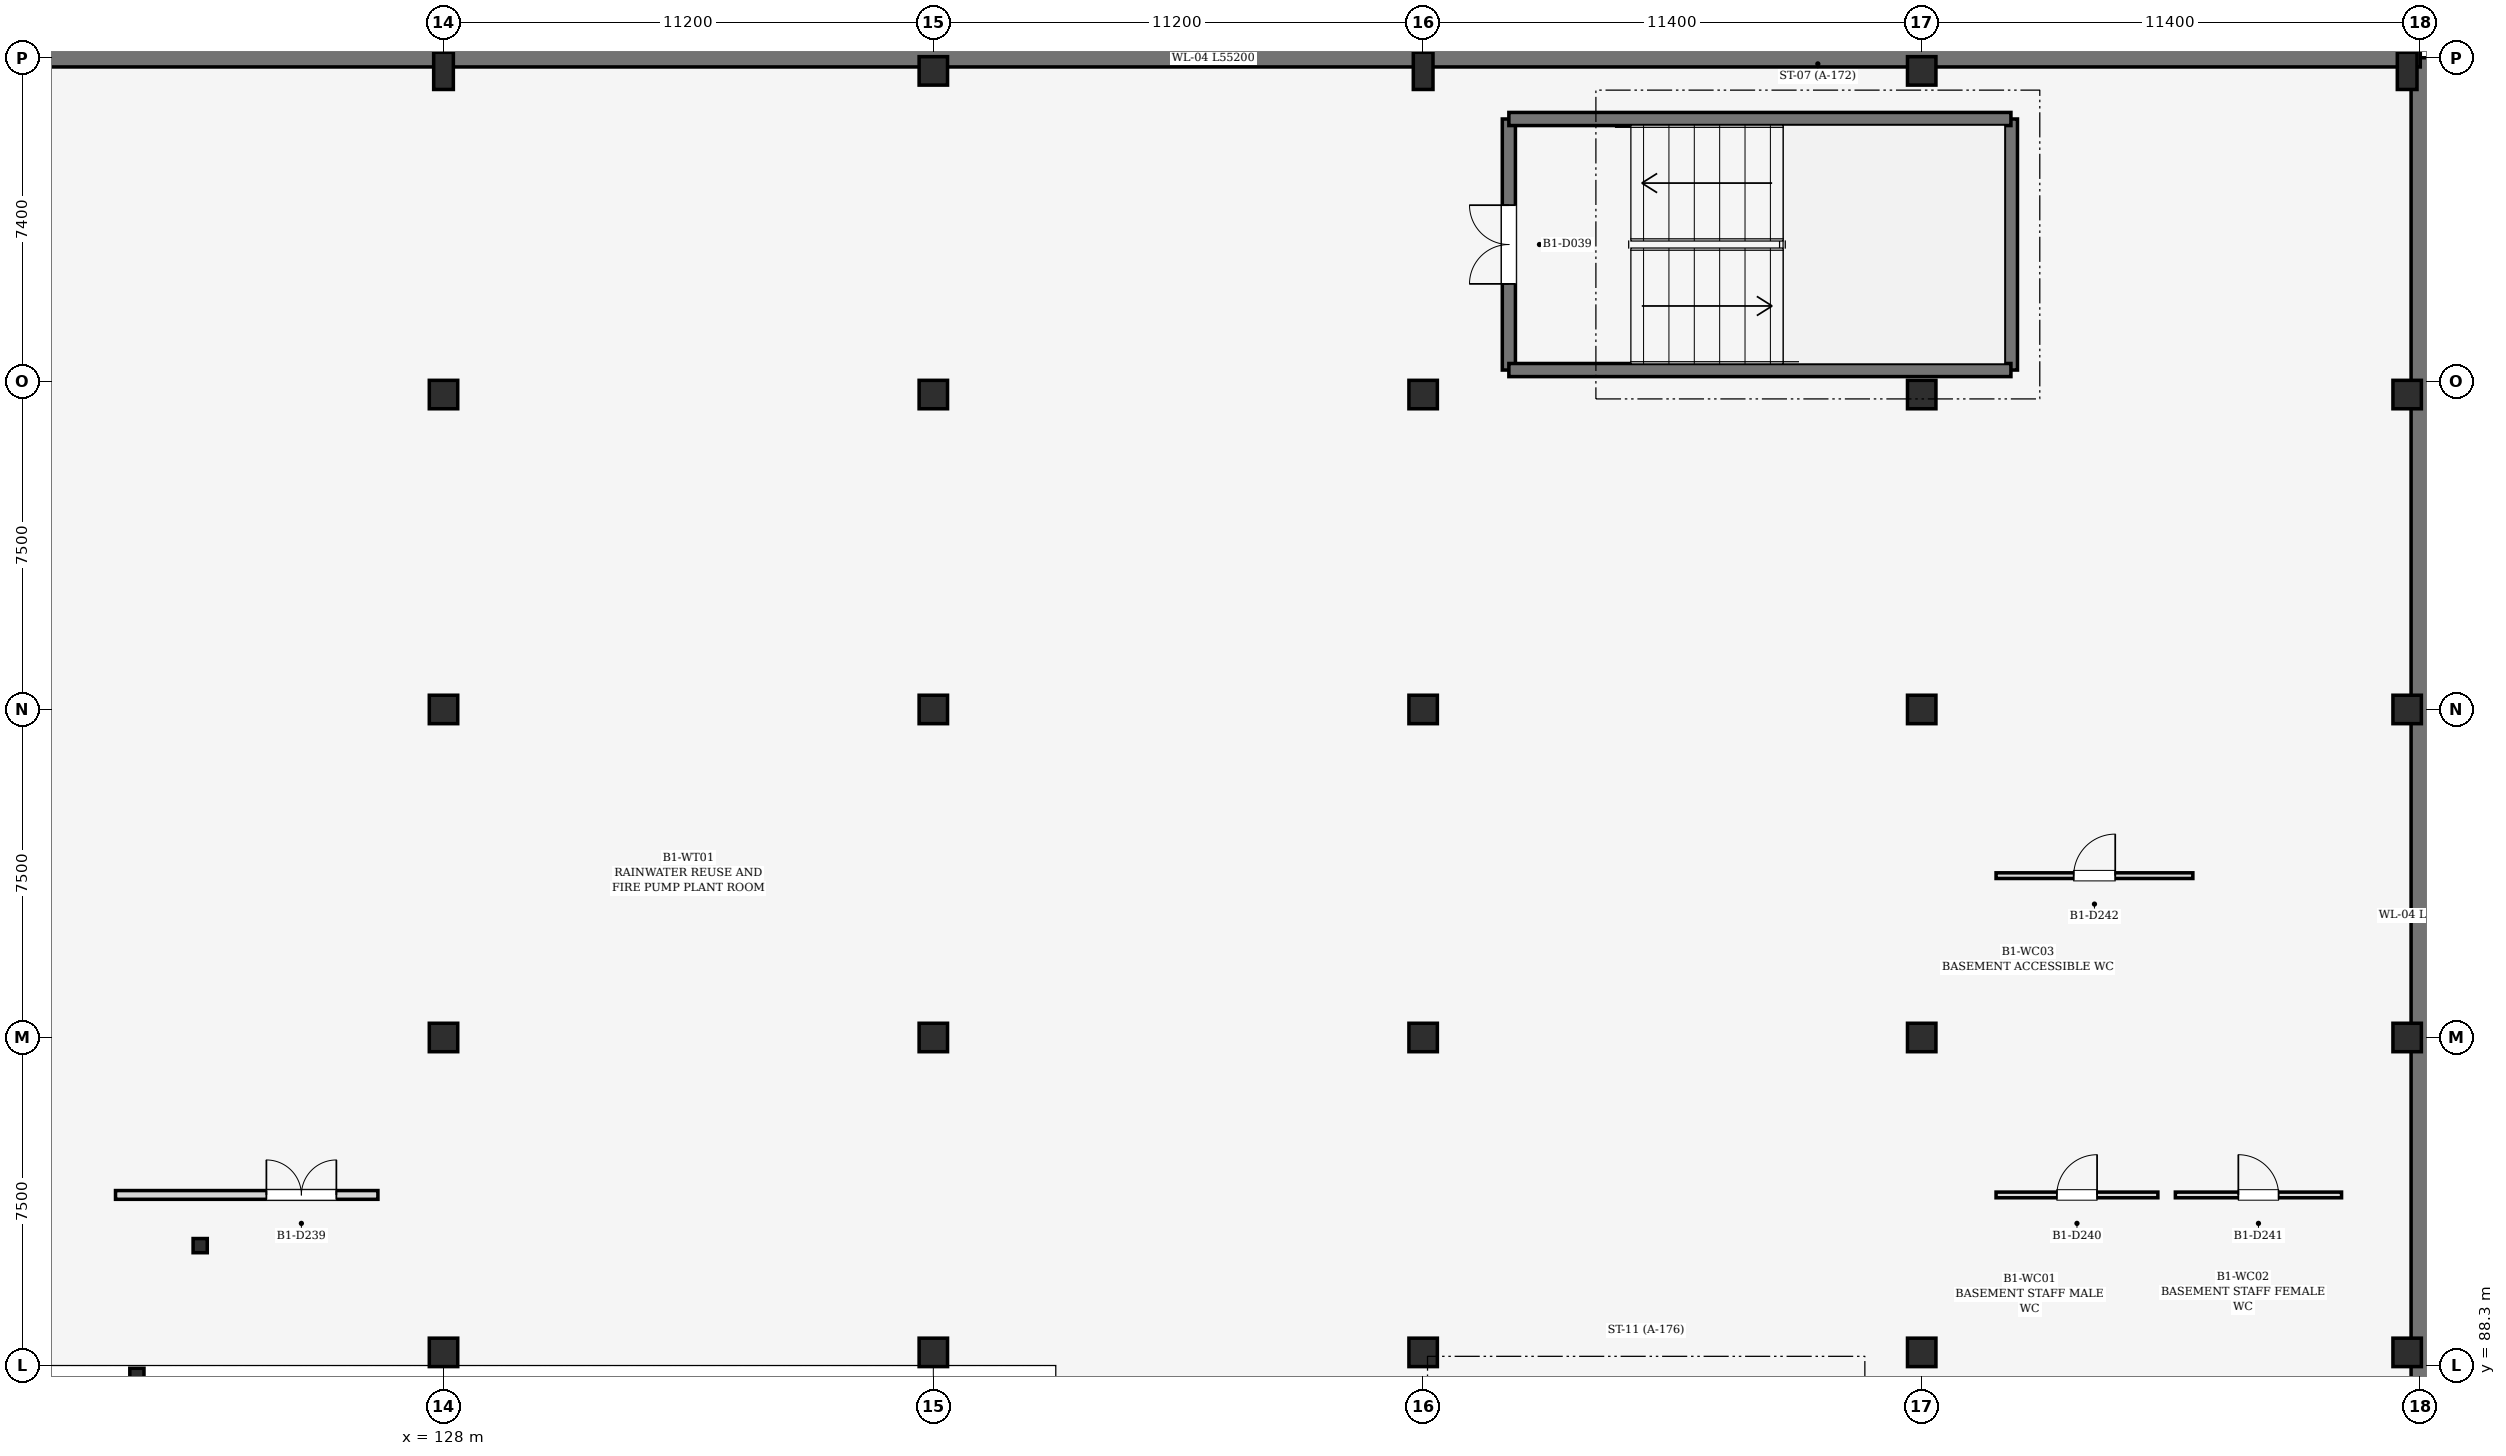
"""IFC4 building model, lengths in metres.
Left out: names, types, materials, properties, quantities, classifications, styles, units other than length and angle.
Written with IfcOpenShell. Run it as: python <this file> out.ifc"""

import sys

from ifc_helpers import new_model, si_unit, direction, frame, frame_2d, origin, origin_2d, place, context, subcontext, project, spatial, rectangle, hollow_circle, extrude, element, fill, save


model = new_model("IFC4")
c1 = context("Model", 3, precision=1e-05, world=origin(), true_north=direction((0.0, 1.0)))
c2 = subcontext(c1, "Body", "Model", "MODEL_VIEW")
j1 = project(units=[si_unit("LENGTHUNIT", "METRE"), si_unit("PLANEANGLEUNIT", "RADIAN")], contexts=[c1])
p1 = place(None, origin())
s1 = spatial("IfcSite", under=j1, at=p1, CompositionType="ELEMENT")
p2 = place(p1, origin())
s2 = spatial("IfcBuilding", under=s1, at=p2, CompositionType="ELEMENT")
p3 = place(p2, frame((0.0, 0.0, -4.8)))
s3 = spatial("IfcBuildingStorey", under=s2, at=p3, CompositionType="ELEMENT", Elevation=-4.8)
for number, where, z_axis, x_axis in (
    (1, (128.0, 88.6, 0.0), (0.0, 0.0, 1.0), (1.0, 0.0, 0.0)),
    (2, (128.0, 95.8, 0.0), (0.0, 0.0, 1.0), (1.0, 0.0, 0.0)),
    (3, (128.0, 103.3, 0.0), (0.0, 0.0, 1.0), (1.0, 0.0, 0.0)),
    (4, (128.0, 110.5, 0.0), (0.0, 0.0, 1.0), (1.0, 0.0, 0.0)),
):
    element("IfcColumn", number, at=place(p3, frame(where, z_axis=z_axis, x_axis=x_axis)), inside=s3, PredefinedType="COLUMN", context=c2, shape_type="SweptSolid", body=[
        extrude(rectangle(XDim=0.65, YDim=0.65, at=origin_2d()), origin(), (0.0, 0.0, 1.0), 4.8),
    ])
p4 = place(p3, frame((128.0, 117.9, 0.0), z_axis=(0.0, 0.0, 1.0), x_axis=(1.0, 0.0, 0.0)))
e5 = element("IfcColumn", 5, at=p4, inside=s3, PredefinedType="PILASTER", context=c2, shape_type="SweptSolid", body=[
    extrude(rectangle(XDim=0.45, YDim=0.85, at=origin_2d()), origin(), (0.0, 0.0, 1.0), 4.8),
])
for number, where, z_axis, x_axis in (
    (6, (139.2, 88.6, 0.0), (0.0, 0.0, 1.0), (1.0, 0.0, 0.0)),
    (7, (139.2, 95.8, 0.0), (0.0, 0.0, 1.0), (1.0, 0.0, 0.0)),
    (8, (139.2, 103.3, 0.0), (0.0, 0.0, 1.0), (1.0, 0.0, 0.0)),
    (9, (139.2, 110.5, 0.0), (0.0, 0.0, 1.0), (1.0, 0.0, 0.0)),
    (10, (139.2, 117.9, 0.0), (0.0, 0.0, 1.0), (1.0, 0.0, 0.0)),
    (11, (150.4, 88.6, 0.0), (0.0, 0.0, 1.0), (1.0, 0.0, 0.0)),
    (12, (150.4, 95.8, 0.0), (0.0, 0.0, 1.0), (1.0, 0.0, 0.0)),
    (13, (150.4, 103.3, 0.0), (0.0, 0.0, 1.0), (1.0, 0.0, 0.0)),
    (14, (150.4, 110.5, 0.0), (0.0, 0.0, 1.0), (1.0, 0.0, 0.0)),
):
    element("IfcColumn", number, at=place(p3, frame(where, z_axis=z_axis, x_axis=x_axis)), inside=s3, PredefinedType="COLUMN", context=c2, shape_type="SweptSolid", body=[
        extrude(rectangle(XDim=0.65, YDim=0.65, at=origin_2d()), origin(), (0.0, 0.0, 1.0), 4.8),
    ])
p5 = place(p3, frame((150.4, 117.9, 0.0), z_axis=(0.0, 0.0, 1.0), x_axis=(1.0, 0.0, 0.0)))
e15 = element("IfcColumn", 15, at=p5, inside=s3, PredefinedType="PILASTER", context=c2, shape_type="SweptSolid", body=[
    extrude(rectangle(XDim=0.45, YDim=0.85, at=origin_2d()), origin(), (0.0, 0.0, 1.0), 4.8),
])
for number, where, z_axis, x_axis in (
    (16, (161.8, 88.6, 0.0), (0.0, 0.0, 1.0), (1.0, 0.0, 0.0)),
    (17, (161.8, 95.8, 0.0), (0.0, 0.0, 1.0), (1.0, 0.0, 0.0)),
    (18, (161.8, 103.3, 0.0), (0.0, 0.0, 1.0), (1.0, 0.0, 0.0)),
    (19, (161.8, 110.5, 0.0), (0.0, 0.0, 1.0), (1.0, 0.0, 0.0)),
    (20, (161.8, 117.9, 0.0), (0.0, 0.0, 1.0), (1.0, 0.0, 0.0)),
    (21, (172.9, 88.6, 0.0), (0.0, 0.0, 1.0), (1.0, 0.0, 0.0)),
    (22, (172.9, 95.8, 0.0), (0.0, 0.0, 1.0), (1.0, 0.0, 0.0)),
    (23, (172.9, 103.3, 0.0), (0.0, 0.0, 1.0), (1.0, 0.0, 0.0)),
    (24, (172.9, 110.5, 0.0), (0.0, 0.0, 1.0), (1.0, 0.0, 0.0)),
):
    element("IfcColumn", number, at=place(p3, frame(where, z_axis=z_axis, x_axis=x_axis)), inside=s3, PredefinedType="COLUMN", context=c2, shape_type="SweptSolid", body=[
        extrude(rectangle(XDim=0.65, YDim=0.65, at=origin_2d()), origin(), (0.0, 0.0, 1.0), 4.8),
    ])
p6 = place(p3, frame((172.9, 117.9, 0.0), z_axis=(0.0, 0.0, 1.0), x_axis=(1.0, 0.0, 0.0)))
e25 = element("IfcColumn", 25, at=p6, inside=s3, PredefinedType="PILASTER", context=c2, shape_type="SweptSolid", body=[
    extrude(rectangle(XDim=0.45, YDim=0.85, at=origin_2d()), origin(), (0.0, 0.0, 1.0), 4.8),
])
for number, where, z_axis, x_axis in (
    (26, (122.436, 91.041, 0.0), (0.0, 0.0, 1.0), (1.0, 0.0, 0.0)),
    (27, (120.989, 88.075, 0.0), (0.0, 0.0, 1.0), (1.0, 0.0, 0.0)),
):
    element("IfcColumn", number, at=place(p3, frame(where, z_axis=z_axis, x_axis=x_axis)), inside=s3, PredefinedType="COLUMN", context=c2, shape_type="SweptSolid", body=[
        extrude(hollow_circle(Radius=0.162, WallThickness=0.013, at=origin_2d()), origin(), (0.0, 0.0, 1.0), 4.8),
    ])
p7 = place(p3, frame((173.2, 58.3, 0.0), z_axis=(0.0, 0.0, 1.0), x_axis=(0.0, 1.0, 0.0)))
e28 = element("IfcWall", 28, at=p7, inside=s3, PredefinedType="SOLIDWALL", context=c2, shape_type="SweptSolid", body=[
    extrude(rectangle(XDim=59.9, YDim=0.42, at=frame_2d((29.95, 0.0))), origin(), (0.0, 0.0, 1.0), 4.48),
])
p8 = place(p3, frame((173.2, 118.2, 0.0), z_axis=(0.0, 0.0, 1.0), x_axis=(-1.0, 0.0, 0.0)))
e29 = element("IfcWall", 29, at=p8, inside=s3, PredefinedType="SOLIDWALL", context=c2, shape_type="SweptSolid", body=[
    extrude(rectangle(XDim=55.2, YDim=0.42, at=frame_2d((27.6, 0.0))), origin(), (0.0, 0.0, 1.0), 4.48),
])
p9 = place(p3, frame((152.36, 111.06, 0.0), z_axis=(0.0, 0.0, 1.0), x_axis=(0.0, 1.0, 0.0)))
e30 = element("IfcWall", 30, at=p9, inside=s3, PredefinedType="SHEAR", context=c2, shape_type="SweptSolid", body=[
    extrude(rectangle(XDim=5.74, YDim=0.3, at=frame_2d((2.87, 0.0))), origin(), (0.0, 0.0, 1.0), 4.48),
])
p10 = place(p9, frame((1.97, 0.0, 0.0)))
e31 = element("IfcOpeningElement", 31, at=p10, cuts=e30, PredefinedType="OPENING", context=c2, shape_type="SweptSolid", body=[
    extrude(rectangle(XDim=1.8, YDim=2.2, at=frame_2d((0.9, 1.1))), frame((0.0, 0.162, 0.0), z_axis=(0.0, -1.0, 0.0), x_axis=(1.0, 0.0, 0.0)), (0.0, 0.0, 1.0), 0.324),
])
p11 = place(p3, frame((163.84, 116.8, 0.0), z_axis=(0.0, 0.0, 1.0), x_axis=(0.0, -1.0, 0.0)))
e32 = element("IfcWall", 32, at=p11, inside=s3, PredefinedType="SHEAR", context=c2, shape_type="SweptSolid", body=[
    extrude(rectangle(XDim=5.74, YDim=0.3, at=frame_2d((2.87, 0.0))), origin(), (0.0, 0.0, 1.0), 4.48),
])
for number, where, z_axis, x_axis in (
    (33, (163.84, 111.06, 0.0), (0.0, 0.0, 1.0), (-1.0, 0.0, 0.0)),
    (34, (152.36, 116.8, 0.0), (0.0, 0.0, 1.0), (1.0, 0.0, 0.0)),
):
    element("IfcWall", number, at=place(p3, frame(where, z_axis=z_axis, x_axis=x_axis)), inside=s3, PredefinedType="SHEAR", context=c2, shape_type="SweptSolid", body=[
        extrude(rectangle(XDim=11.48, YDim=0.3, at=frame_2d((5.74, 0.0))), origin(), (0.0, 0.0, 1.0), 4.48),
    ])
p12 = place(p3, frame((120.5, 92.2, 0.0), z_axis=(0.0, 0.0, 1.0), x_axis=(1.0, 0.0, 0.0)))
e35 = element("IfcWall", 35, at=p12, inside=s3, PredefinedType="PARTITIONING", context=c2, shape_type="SweptSolid", body=[
    extrude(rectangle(XDim=6.0, YDim=0.2, at=frame_2d((3.0, 0.0))), origin(), (0.0, 0.0, 1.0), 3.937),
])
p13 = place(p12, frame((3.45, 0.0, 0.0)))
e36 = element("IfcOpeningElement", 36, at=p13, cuts=e35, PredefinedType="OPENING", context=c2, shape_type="SweptSolid", body=[
    extrude(rectangle(XDim=1.6, YDim=2.15, at=frame_2d((0.8, 1.075))), frame((0.0, 0.112, 0.0), z_axis=(0.0, -1.0, 0.0), x_axis=(1.0, 0.0, 0.0)), (0.0, 0.0, 1.0), 0.224),
])
p14 = place(p3, frame((163.5, 92.2, 0.0), z_axis=(0.0, 0.0, 1.0), x_axis=(1.0, 0.0, 0.0)))
e37 = element("IfcWall", 37, at=p14, inside=s3, PredefinedType="PARTITIONING", context=c2, shape_type="SweptSolid", body=[
    extrude(rectangle(XDim=3.7, YDim=0.13, at=frame_2d((1.85, 0.0))), origin(), (0.0, 0.0, 1.0), 4.465),
])
p15 = place(p14, frame((1.39, 0.0, 0.0)))
e38 = element("IfcOpeningElement", 38, at=p15, cuts=e37, PredefinedType="OPENING", context=c2, shape_type="SweptSolid", body=[
    extrude(rectangle(XDim=0.92, YDim=2.1, at=frame_2d((0.46, 1.05))), frame((0.0, 0.077, 0.0), z_axis=(0.0, -1.0, 0.0), x_axis=(1.0, 0.0, 0.0)), (0.0, 0.0, 1.0), 0.154),
])
p16 = place(p3, frame((167.6, 92.2, 0.0), z_axis=(0.0, 0.0, 1.0), x_axis=(1.0, 0.0, 0.0)))
e39 = element("IfcWall", 39, at=p16, inside=s3, PredefinedType="PARTITIONING", context=c2, shape_type="SweptSolid", body=[
    extrude(rectangle(XDim=3.8, YDim=0.13, at=frame_2d((1.9, 0.0))), origin(), (0.0, 0.0, 1.0), 4.465),
])
p17 = place(p16, frame((1.44, 0.0, 0.0)))
e40 = element("IfcOpeningElement", 40, at=p17, cuts=e39, PredefinedType="OPENING", context=c2, shape_type="SweptSolid", body=[
    extrude(rectangle(XDim=0.92, YDim=2.1, at=frame_2d((0.46, 1.05))), frame((0.0, 0.077, 0.0), z_axis=(0.0, -1.0, 0.0), x_axis=(1.0, 0.0, 0.0)), (0.0, 0.0, 1.0), 0.154),
])
p18 = place(p3, frame((163.5, 99.5, 0.0), z_axis=(0.0, 0.0, 1.0), x_axis=(1.0, 0.0, 0.0)))
e41 = element("IfcWall", 41, at=p18, inside=s3, PredefinedType="PARTITIONING", context=c2, shape_type="SweptSolid", body=[
    extrude(rectangle(XDim=4.5, YDim=0.13, at=frame_2d((2.25, 0.0))), origin(), (0.0, 0.0, 1.0), 4.465),
])
p19 = place(p18, frame((1.775, 0.0, 0.0)))
e42 = element("IfcOpeningElement", 42, at=p19, cuts=e41, PredefinedType="OPENING", context=c2, shape_type="SweptSolid", body=[
    extrude(rectangle(XDim=0.95, YDim=2.15, at=frame_2d((0.475, 1.075))), frame((0.0, 0.077, 0.0), z_axis=(0.0, -1.0, 0.0), x_axis=(1.0, 0.0, 0.0)), (0.0, 0.0, 1.0), 0.154),
])
p20 = place(p10, origin())
e43 = element("IfcDoor", 43, at=p20, inside=s3, OperationType="DOUBLE_DOOR_SINGLE_SWING", PredefinedType="DOOR", context=c2, shape_type="SweptSolid", body=[
    extrude(rectangle(XDim=1.8, YDim=2.2, at=frame_2d((0.9, 1.1))), frame((0.0, 0.025, 0.0), z_axis=(0.0, -1.0, 0.0), x_axis=(1.0, 0.0, 0.0)), (0.0, 0.0, 1.0), 0.05),
])
fill(e31, e43)
p21 = place(p13, origin())
e44 = element("IfcDoor", 44, at=p21, inside=s3, OperationType="DOUBLE_DOOR_SINGLE_SWING", PredefinedType="DOOR", context=c2, shape_type="SweptSolid", body=[
    extrude(rectangle(XDim=1.6, YDim=2.15, at=frame_2d((0.8, 1.075))), frame((0.0, 0.025, 0.0), z_axis=(0.0, -1.0, 0.0), x_axis=(1.0, 0.0, 0.0)), (0.0, 0.0, 1.0), 0.05),
])
fill(e36, e44)
p22 = place(p15, origin())
e45 = element("IfcDoor", 45, at=p22, inside=s3, OperationType="SINGLE_SWING_RIGHT", PredefinedType="DOOR", context=c2, shape_type="SweptSolid", body=[
    extrude(rectangle(XDim=0.92, YDim=2.1, at=frame_2d((0.46, 1.05))), frame((0.0, 0.025, 0.0), z_axis=(0.0, -1.0, 0.0), x_axis=(1.0, 0.0, 0.0)), (0.0, 0.0, 1.0), 0.05),
])
fill(e38, e45)
p23 = place(p17, origin())
e46 = element("IfcDoor", 46, at=p23, inside=s3, OperationType="SINGLE_SWING_LEFT", PredefinedType="DOOR", context=c2, shape_type="SweptSolid", body=[
    extrude(rectangle(XDim=0.92, YDim=2.1, at=frame_2d((0.46, 1.05))), frame((0.0, 0.025, 0.0), z_axis=(0.0, -1.0, 0.0), x_axis=(1.0, 0.0, 0.0)), (0.0, 0.0, 1.0), 0.05),
])
fill(e40, e46)
p24 = place(p19, origin())
e47 = element("IfcDoor", 47, at=p24, inside=s3, OperationType="SINGLE_SWING_RIGHT", PredefinedType="DOOR", context=c2, shape_type="SweptSolid", body=[
    extrude(rectangle(XDim=0.95, YDim=2.15, at=frame_2d((0.475, 1.075))), frame((0.0, 0.025, 0.0), z_axis=(0.0, -1.0, 0.0), x_axis=(1.0, 0.0, 0.0)), (0.0, 0.0, 1.0), 0.05),
])
fill(e42, e47)
save(model, sys.argv[1])
